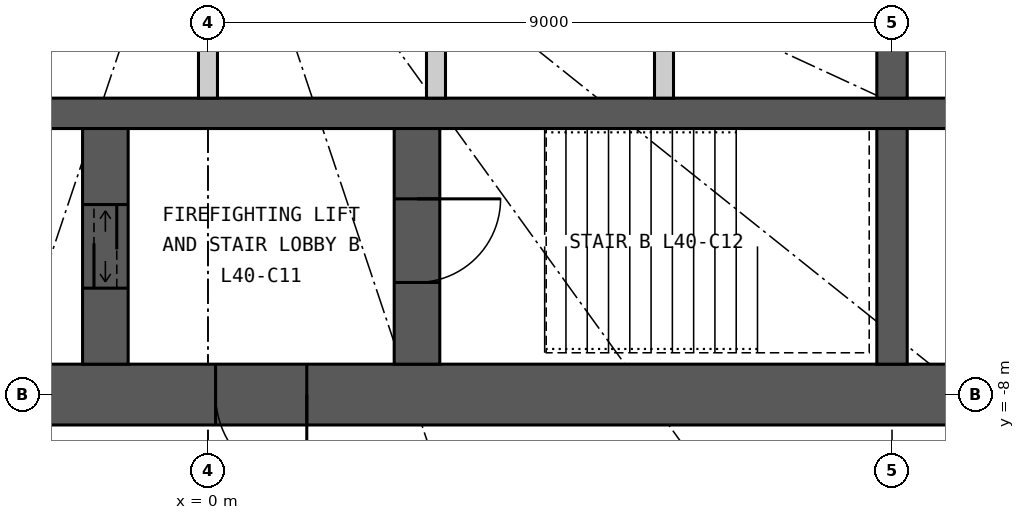
"""IFC4 building model, lengths in metres.
Left out: names, types, materials, properties, quantities, classifications, styles, units other than length and angle.
Written with IfcOpenShell. Run it as: python <this file> out.ifc"""

import sys

from ifc_helpers import new_model, si_unit, direction, frame, frame_2d, origin, place, context, subcontext, project, spatial, rectangle, extrude, element, fill, save


model = new_model("IFC4")
c1 = context("Model", 3, precision=1e-05, world=origin(), true_north=direction((0.0, 1.0)))
c2 = subcontext(c1, "Body", "Model", "MODEL_VIEW")
j1 = project(units=[si_unit("LENGTHUNIT", "METRE"), si_unit("PLANEANGLEUNIT", "RADIAN")], contexts=[c1])
p1 = place(None, origin())
s1 = spatial("IfcSite", under=j1, at=p1, CompositionType="ELEMENT")
p2 = place(p1, origin())
s2 = spatial("IfcBuilding", under=s1, at=p2, CompositionType="ELEMENT")
p3 = place(p2, frame((0.0, 0.0, 153.3)))
s3 = spatial("IfcBuildingStorey", under=s2, at=p3, CompositionType="ELEMENT", Elevation=153.3)
p4 = place(p3, frame((12.4, -8.0, 0.0), z_axis=(0.0, 0.0, 1.0), x_axis=(-1.0, 0.0, 0.0)))
e1 = element("IfcWall", 1, at=p4, inside=s3, PredefinedType="SHEAR", context=c2, shape_type="SweptSolid", body=[
    extrude(rectangle(XDim=24.8, YDim=0.8, at=frame_2d((12.4, 0.0))), origin(), (0.0, 0.0, 1.0), 3.3),
])
p5 = place(p4, frame((11.1, 0.0, 0.0)))
e2 = element("IfcOpeningElement", 2, at=p5, cuts=e1, PredefinedType="OPENING", context=c2, shape_type="SweptSolid", body=[
    extrude(rectangle(XDim=1.2, YDim=2.2, at=frame_2d((0.6, 1.1))), frame((0.0, 0.41, 0.0), z_axis=(0.0, -1.0, 0.0), x_axis=(1.0, 0.0, 0.0)), (0.0, 0.0, 1.0), 0.82),
])
p6 = place(p4, frame((18.7, 0.0, 0.0)))
e3 = element("IfcOpeningElement", 3, at=p6, cuts=e1, PredefinedType="OPENING", context=c2, shape_type="SweptSolid", body=[
    extrude(rectangle(XDim=0.9, YDim=2.2, at=frame_2d((0.45, 1.1))), frame((0.0, 0.41, 0.0), z_axis=(0.0, -1.0, 0.0), x_axis=(1.0, 0.0, 0.0)), (0.0, 0.0, 1.0), 0.82),
])
p7 = place(p3, frame((-11.6, -4.3, 0.0), z_axis=(0.0, 0.0, 1.0), x_axis=(1.0, 0.0, 0.0)))
e4 = element("IfcWall", 4, at=p7, inside=s3, PredefinedType="SHEAR", context=c2, shape_type="SweptSolid", body=[
    extrude(rectangle(XDim=23.2, YDim=0.4, at=frame_2d((11.6, 0.0))), origin(), (0.0, 0.0, 1.0), 3.3),
])
p8 = place(p3, frame((9.0, -4.1, 0.0), z_axis=(0.0, 0.0, 1.0), x_axis=(0.0, 1.0, 0.0)))
e5 = element("IfcWall", 5, at=p8, inside=s3, PredefinedType="SHEAR", context=c2, shape_type="SweptSolid", body=[
    extrude(rectangle(XDim=2.35, YDim=0.4, at=frame_2d((1.175, 0.0))), origin(), (0.0, 0.0, 1.0), 3.3),
])
p9 = place(p3, frame((9.0, -7.6, 0.0), z_axis=(0.0, 0.0, 1.0), x_axis=(0.0, 1.0, 0.0)))
e6 = element("IfcWall", 6, at=p9, inside=s3, PredefinedType="SHEAR", context=c2, shape_type="SweptSolid", body=[
    extrude(rectangle(XDim=3.1, YDim=0.4, at=frame_2d((1.55, 0.0))), origin(), (0.0, 0.0, 1.0), 3.3),
])
p10 = place(p3, frame((2.75, -7.6, 0.0), z_axis=(0.0, 0.0, 1.0), x_axis=(0.0, 1.0, 0.0)))
e7 = element("IfcWall", 7, at=p10, inside=s3, PredefinedType="SHEAR", context=c2, shape_type="SweptSolid", body=[
    extrude(rectangle(XDim=3.1, YDim=0.6, at=frame_2d((1.55, 0.0))), origin(), (0.0, 0.0, 1.0), 3.3),
])
p11 = place(p10, frame((1.075, 0.0, 0.0)))
e8 = element("IfcOpeningElement", 8, at=p11, cuts=e7, PredefinedType="OPENING", context=c2, shape_type="SweptSolid", body=[
    extrude(rectangle(XDim=1.1, YDim=2.2, at=frame_2d((0.55, 1.1))), frame((0.0, 0.31, 0.0), z_axis=(0.0, -1.0, 0.0), x_axis=(1.0, 0.0, 0.0)), (0.0, 0.0, 1.0), 0.62),
])
p12 = place(p3, frame((-1.35, -7.6, 0.0), z_axis=(0.0, 0.0, 1.0), x_axis=(0.0, 1.0, 0.0)))
e9 = element("IfcWall", 9, at=p12, inside=s3, PredefinedType="SHEAR", context=c2, shape_type="SweptSolid", body=[
    extrude(rectangle(XDim=3.1, YDim=0.6, at=frame_2d((1.55, 0.0))), origin(), (0.0, 0.0, 1.0), 3.3),
])
p13 = place(p12, frame((1.0, 0.0, 0.0)))
e10 = element("IfcOpeningElement", 10, at=p13, cuts=e9, PredefinedType="OPENING", context=c2, shape_type="SweptSolid", body=[
    extrude(rectangle(XDim=1.1, YDim=2.2, at=frame_2d((0.55, 1.1))), frame((0.0, 0.31, 0.0), z_axis=(0.0, -1.0, 0.0), x_axis=(1.0, 0.0, 0.0)), (0.0, 0.0, 1.0), 0.62),
])
for number, where, z_axis, x_axis in (
    (11, (0.0, -4.1, 0.0), (0.0, 0.0, 1.0), (0.0, 1.0, 0.0)),
    (12, (3.0, -4.1, 0.0), (0.0, 0.0, 1.0), (0.0, 1.0, 0.0)),
    (13, (6.0, -4.1, 0.0), (0.0, 0.0, 1.0), (0.0, 1.0, 0.0)),
):
    element("IfcWall", number, at=place(p3, frame(where, z_axis=z_axis, x_axis=x_axis)), inside=s3, PredefinedType="PARTITIONING", context=c2, shape_type="SweptSolid", body=[
        extrude(rectangle(XDim=2.35, YDim=0.25, at=frame_2d((1.175, 0.0))), origin(), (0.0, 0.0, 1.0), 3.3),
    ])
p14 = place(p5, origin())
e14 = element("IfcDoor", 14, at=p14, inside=s3, OperationType="SINGLE_SWING_LEFT", PredefinedType="DOOR", context=c2, shape_type="SweptSolid", body=[
    extrude(rectangle(XDim=1.2, YDim=2.2, at=frame_2d((0.6, 1.1))), frame((0.0, 0.025, 0.0), z_axis=(0.0, -1.0, 0.0), x_axis=(1.0, 0.0, 0.0)), (0.0, 0.0, 1.0), 0.05),
])
fill(e2, e14)
p15 = place(p11, origin())
e15 = element("IfcDoor", 15, at=p15, inside=s3, OperationType="SINGLE_SWING_RIGHT", PredefinedType="DOOR", context=c2, shape_type="SweptSolid", body=[
    extrude(rectangle(XDim=1.1, YDim=2.2, at=frame_2d((0.55, 1.1))), frame((0.0, 0.025, 0.0), z_axis=(0.0, -1.0, 0.0), x_axis=(1.0, 0.0, 0.0)), (0.0, 0.0, 1.0), 0.05),
])
fill(e8, e15)
p16 = place(p13, origin())
e16 = element("IfcDoor", 16, at=p16, inside=s3, OperationType="DOUBLE_DOOR_SLIDING", PredefinedType="DOOR", context=c2, shape_type="SweptSolid", body=[
    extrude(rectangle(XDim=1.1, YDim=2.2, at=frame_2d((0.55, 1.1))), frame((0.0, 0.025, 0.0), z_axis=(0.0, -1.0, 0.0), x_axis=(1.0, 0.0, 0.0)), (0.0, 0.0, 1.0), 0.05),
])
fill(e10, e16)
save(model, sys.argv[1])
